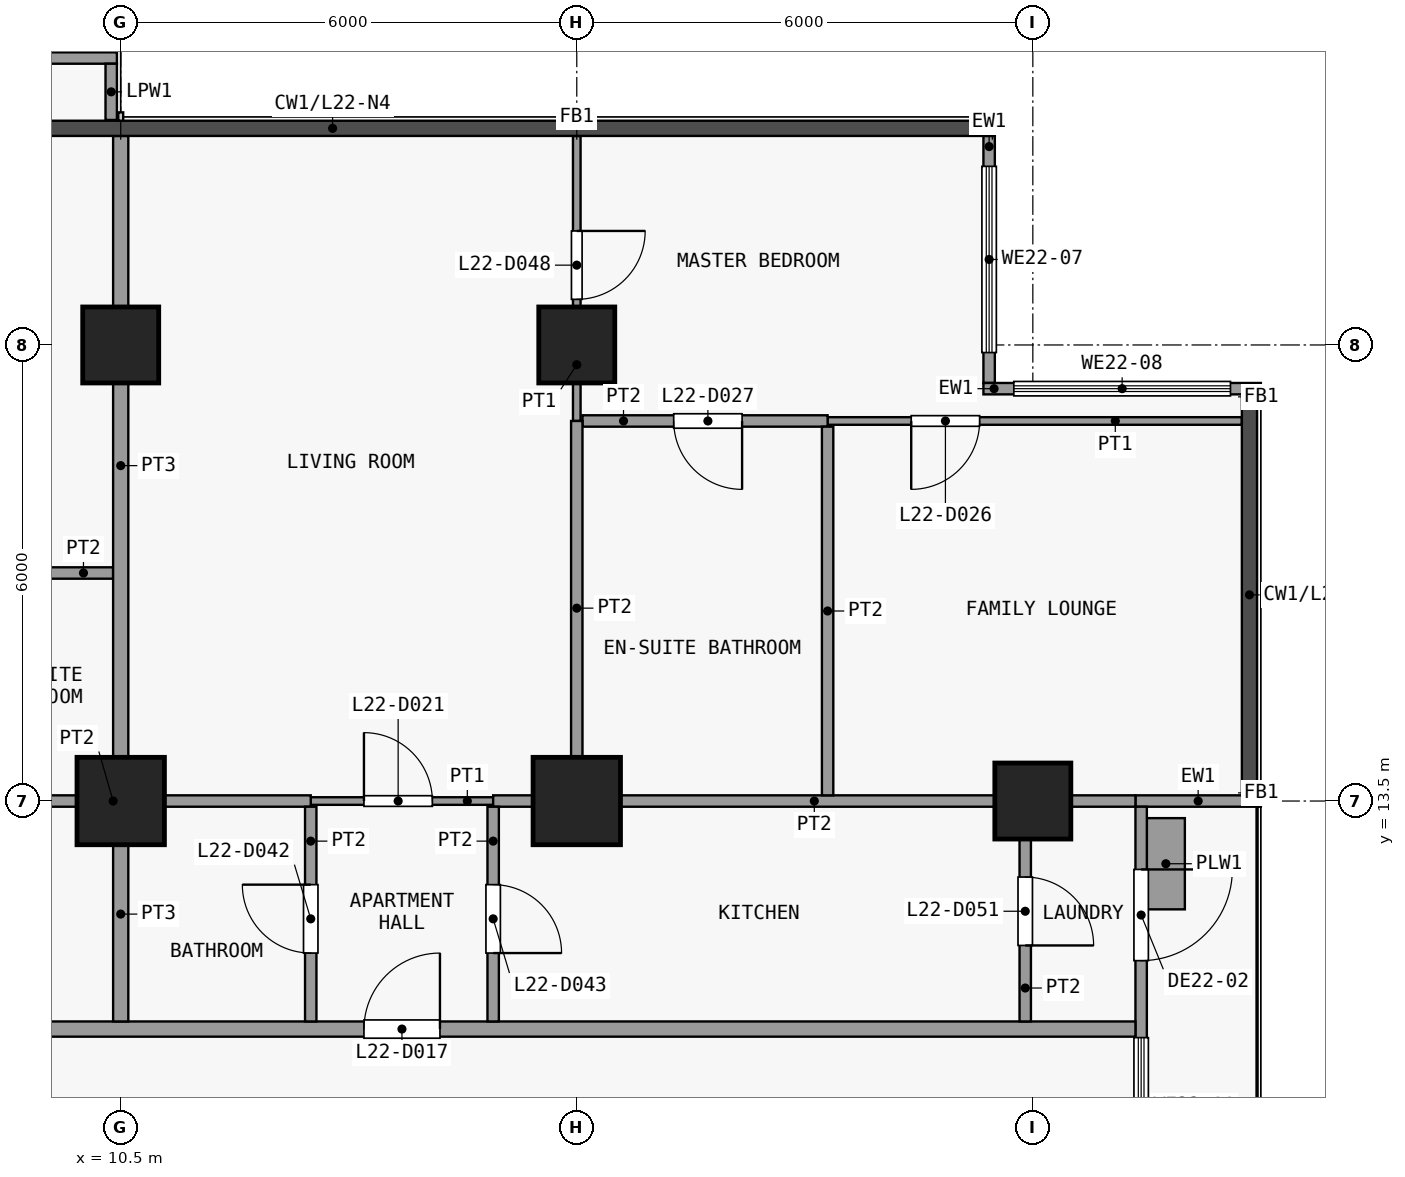
"""IFC4 building model, lengths in metres.
Left out: names, types, materials, properties, quantities, classifications, styles, units other than length and angle.
Written with IfcOpenShell. Run it as: python <this file> out.ifc"""

import sys

from ifc_helpers import new_model, si_unit, direction, frame, frame_2d, origin, origin_2d, place, context, subcontext, project, spatial, rectangle, extrude, element, fill, save


model = new_model("IFC4")
c1 = context("Model", 3, precision=1e-05, world=origin(), true_north=direction((0.0, 1.0)))
c2 = subcontext(c1, "Body", "Model", "MODEL_VIEW")
j1 = project(units=[si_unit("LENGTHUNIT", "METRE"), si_unit("PLANEANGLEUNIT", "RADIAN")], contexts=[c1])
p1 = place(None, origin())
s1 = spatial("IfcSite", under=j1, at=p1, CompositionType="ELEMENT")
p2 = place(p1, origin())
s2 = spatial("IfcBuilding", under=s1, at=p2, CompositionType="ELEMENT")
p3 = place(p2, frame((0.0, 0.0, 91.9)))
s3 = spatial("IfcBuildingStorey", under=s2, at=p3, CompositionType="ELEMENT", Elevation=91.9)
p4 = place(p3, frame((10.5, 13.5, 0.0), z_axis=(0.0, 0.0, 1.0), x_axis=(1.0, 0.0, 0.0)))
e1 = element("IfcColumn", 1, at=p4, inside=s3, PredefinedType="COLUMN", context=c2, shape_type="SweptSolid", body=[
    extrude(rectangle(XDim=1.15, YDim=1.15, at=origin_2d()), origin(), (0.0, 0.0, 1.0), 3.6),
])
p5 = place(p3, frame((10.5, 19.5, 0.0), z_axis=(0.0, 0.0, 1.0), x_axis=(1.0, 0.0, 0.0)))
e2 = element("IfcColumn", 2, at=p5, inside=s3, PredefinedType="COLUMN", context=c2, shape_type="SweptSolid", body=[
    extrude(rectangle(XDim=1.0, YDim=1.0, at=origin_2d()), origin(), (0.0, 0.0, 1.0), 3.6),
])
p6 = place(p3, frame((16.5, 13.5, 0.0), z_axis=(0.0, 0.0, 1.0), x_axis=(1.0, 0.0, 0.0)))
e3 = element("IfcColumn", 3, at=p6, inside=s3, PredefinedType="COLUMN", context=c2, shape_type="SweptSolid", body=[
    extrude(rectangle(XDim=1.15, YDim=1.15, at=origin_2d()), origin(), (0.0, 0.0, 1.0), 3.6),
])
for number, where, z_axis, x_axis in (
    (4, (16.5, 19.5, 0.0), (0.0, 0.0, 1.0), (1.0, 0.0, 0.0)),
    (5, (22.5, 13.5, 0.0), (0.0, 0.0, 1.0), (1.0, 0.0, 0.0)),
):
    element("IfcColumn", number, at=place(p3, frame(where, z_axis=z_axis, x_axis=x_axis)), inside=s3, PredefinedType="COLUMN", context=c2, shape_type="SweptSolid", body=[
        extrude(rectangle(XDim=1.0, YDim=1.0, at=origin_2d()), origin(), (0.0, 0.0, 1.0), 3.6),
    ])
p7 = place(p3, frame((21.925, 22.25, 0.0), z_axis=(0.0, 0.0, 1.0), x_axis=(0.0, -1.0, 0.0)))
e6 = element("IfcWall", 6, at=p7, inside=s3, PredefinedType="SOLIDWALL", context=c2, shape_type="SweptSolid", body=[
    extrude(rectangle(XDim=3.25, YDim=0.15, at=frame_2d((1.625, 0.0))), origin(), (0.0, 0.0, 1.0), 3.3),
])
p8 = place(p7, frame((0.4, 0.0, 0.9)))
e7 = element("IfcOpeningElement", 7, at=p8, cuts=e6, PredefinedType="OPENING", context=c2, shape_type="SweptSolid", body=[
    extrude(rectangle(XDim=2.45, YDim=2.4, at=frame_2d((1.225, 1.2))), frame((0.0, 0.085, 0.0), z_axis=(0.0, -1.0, 0.0), x_axis=(1.0, 0.0, 0.0)), (0.0, 0.0, 1.0), 0.17),
])
p9 = place(p3, frame((21.85, 18.925, 0.0), z_axis=(0.0, 0.0, 1.0), x_axis=(1.0, 0.0, 0.0)))
e8 = element("IfcWall", 8, at=p9, inside=s3, PredefinedType="SOLIDWALL", context=c2, shape_type="SweptSolid", body=[
    extrude(rectangle(XDim=3.65, YDim=0.15, at=frame_2d((1.825, 0.0))), origin(), (0.0, 0.0, 1.0), 3.3),
])
p10 = place(p9, frame((0.4, 0.0, 0.9)))
e9 = element("IfcOpeningElement", 9, at=p10, cuts=e8, PredefinedType="OPENING", context=c2, shape_type="SweptSolid", body=[
    extrude(rectangle(XDim=2.85, YDim=2.4, at=frame_2d((1.425, 1.2))), frame((0.0, 0.085, 0.0), z_axis=(0.0, -1.0, 0.0), x_axis=(1.0, 0.0, 0.0)), (0.0, 0.0, 1.0), 0.17),
])
p11 = place(p3, frame((23.85, 13.5, 0.0), z_axis=(0.0, 0.0, 1.0), x_axis=(1.0, 0.0, 0.0)))
e10 = element("IfcWall", 10, at=p11, inside=s3, PredefinedType="SOLIDWALL", context=c2, shape_type="SweptSolid", body=[
    extrude(rectangle(XDim=1.65, YDim=0.15, at=frame_2d((0.825, 0.0))), origin(), (0.0, 0.0, 1.0), 3.3),
])
p12 = place(p3, frame((23.925, 13.425, 0.0), z_axis=(0.0, 0.0, 1.0), x_axis=(0.0, -1.0, 0.0)))
e11 = element("IfcWall", 11, at=p12, inside=s3, PredefinedType="SOLIDWALL", context=c2, shape_type="SweptSolid", body=[
    extrude(rectangle(XDim=5.85, YDim=0.15, at=frame_2d((2.925, 0.0))), origin(), (0.0, 0.0, 1.0), 3.3),
])
p13 = place(p12, frame((0.825, 0.0, 0.0)))
e12 = element("IfcOpeningElement", 12, at=p13, cuts=e11, PredefinedType="OPENING", context=c2, shape_type="SweptSolid", body=[
    extrude(rectangle(XDim=1.2, YDim=2.4, at=frame_2d((0.6, 1.2))), frame((0.0, 0.085, 0.0), z_axis=(0.0, -1.0, 0.0), x_axis=(1.0, 0.0, 0.0)), (0.0, 0.0, 1.0), 0.17),
])
p14 = place(p12, frame((3.038, 0.0, 0.9)))
e13 = element("IfcOpeningElement", 13, at=p14, cuts=e11, PredefinedType="OPENING", context=c2, shape_type="SweptSolid", body=[
    extrude(rectangle(XDim=1.8, YDim=2.1, at=frame_2d((0.9, 1.05))), frame((0.0, 0.085, 0.0), z_axis=(0.0, -1.0, 0.0), x_axis=(1.0, 0.0, 0.0)), (0.0, 0.0, 1.0), 0.17),
])
p15 = place(p3, frame((24.25, 12.075, 0.0), z_axis=(0.0, 0.0, 1.0), x_axis=(0.0, 1.0, 0.0)))
e14 = element("IfcWall", 14, at=p15, inside=s3, PredefinedType="USERDEFINED", context=c2, shape_type="SweptSolid", body=[
    extrude(rectangle(XDim=1.2, YDim=0.5, at=frame_2d((0.6, 0.0))), origin(), (0.0, 0.0, 1.0), 0.9),
])
p16 = place(p3, frame((4.7, 23.275, 0.0), z_axis=(0.0, 0.0, 1.0), x_axis=(1.0, 0.0, 0.0)))
e15 = element("IfcWall", 15, at=p16, inside=s3, PredefinedType="PARAPET", context=c2, shape_type="SweptSolid", body=[
    extrude(rectangle(XDim=5.75, YDim=0.15, at=frame_2d((2.875, 0.0))), origin(), (0.0, 0.0, 1.0), 1.15),
])
p17 = place(p3, frame((10.375, 23.2, 0.0), z_axis=(0.0, 0.0, 1.0), x_axis=(0.0, -1.0, 0.0)))
e16 = element("IfcWall", 16, at=p17, inside=s3, PredefinedType="PARAPET", context=c2, shape_type="SweptSolid", body=[
    extrude(rectangle(XDim=0.74, YDim=0.15, at=frame_2d((0.37, 0.0))), origin(), (0.0, 0.0, 1.0), 1.15),
])
p18 = place(p3, frame((-26.25, 10.5, 0.0), z_axis=(0.0, 0.0, 1.0), x_axis=(1.0, 0.0, 0.0)))
e17 = element("IfcWall", 17, at=p18, inside=s3, PredefinedType="PARTITIONING", context=c2, shape_type="SweptSolid", body=[
    extrude(rectangle(XDim=50.1, YDim=0.2, at=frame_2d((25.05, 0.0))), origin(), (0.0, 0.0, 1.0), 3.3),
])
p19 = place(p18, frame((5.45, 0.0, 0.0)))
e18 = element("IfcOpeningElement", 18, at=p19, cuts=e17, PredefinedType="OPENING", context=c2, shape_type="SweptSolid", body=[
    extrude(rectangle(XDim=1.0, YDim=2.1, at=frame_2d((0.5, 1.05))), frame((0.0, 0.11, 0.0), z_axis=(0.0, -1.0, 0.0), x_axis=(1.0, 0.0, 0.0)), (0.0, 0.0, 1.0), 0.22),
])
p20 = place(p18, frame((13.95, 0.0, 0.0)))
e19 = element("IfcOpeningElement", 19, at=p20, cuts=e17, PredefinedType="OPENING", context=c2, shape_type="SweptSolid", body=[
    extrude(rectangle(XDim=1.0, YDim=2.1, at=frame_2d((0.5, 1.05))), frame((0.0, 0.11, 0.0), z_axis=(0.0, -1.0, 0.0), x_axis=(1.0, 0.0, 0.0)), (0.0, 0.0, 1.0), 0.22),
])
p21 = place(p18, frame((39.95, 0.0, 0.0)))
e20 = element("IfcOpeningElement", 20, at=p21, cuts=e17, PredefinedType="OPENING", context=c2, shape_type="SweptSolid", body=[
    extrude(rectangle(XDim=1.0, YDim=2.1, at=frame_2d((0.5, 1.05))), frame((0.0, 0.11, 0.0), z_axis=(0.0, -1.0, 0.0), x_axis=(1.0, 0.0, 0.0)), (0.0, 0.0, 1.0), 0.22),
])
p22 = place(p3, frame((13.0, 13.5, 0.0), z_axis=(0.0, 0.0, 1.0), x_axis=(1.0, 0.0, 0.0)))
e21 = element("IfcWall", 21, at=p22, inside=s3, PredefinedType="PARTITIONING", context=c2, shape_type="SweptSolid", body=[
    extrude(rectangle(XDim=2.4, YDim=0.1, at=frame_2d((1.2, 0.0))), origin(), (0.0, 0.0, 1.0), 3.3),
])
p23 = place(p22, frame((0.7, 0.0, 0.0)))
e22 = element("IfcOpeningElement", 22, at=p23, cuts=e21, PredefinedType="OPENING", context=c2, shape_type="SweptSolid", body=[
    extrude(rectangle(XDim=0.9, YDim=2.1, at=frame_2d((0.45, 1.05))), frame((0.0, 0.06, 0.0), z_axis=(0.0, -1.0, 0.0), x_axis=(1.0, 0.0, 0.0)), (0.0, 0.0, 1.0), 0.12),
])
p24 = place(p3, frame((7.8, 13.5, 0.0), z_axis=(0.0, 0.0, 1.0), x_axis=(1.0, 0.0, 0.0)))
e23 = element("IfcWall", 23, at=p24, inside=s3, PredefinedType="PARTITIONING", context=c2, shape_type="SweptSolid", body=[
    extrude(rectangle(XDim=5.2, YDim=0.15, at=frame_2d((2.6, 0.0))), origin(), (0.0, 0.0, 1.0), 3.3),
])
p25 = place(p3, frame((15.4, 13.5, 0.0), z_axis=(0.0, 0.0, 1.0), x_axis=(1.0, 0.0, 0.0)))
e24 = element("IfcWall", 24, at=p25, inside=s3, PredefinedType="PARTITIONING", context=c2, shape_type="SweptSolid", body=[
    extrude(rectangle(XDim=8.45, YDim=0.15, at=frame_2d((4.225, 0.0))), origin(), (0.0, 0.0, 1.0), 3.3),
])
p26 = place(p3, frame((7.8, 16.5, 0.0), z_axis=(0.0, 0.0, 1.0), x_axis=(1.0, 0.0, 0.0)))
e25 = element("IfcWall", 25, at=p26, inside=s3, PredefinedType="PARTITIONING", context=c2, shape_type="SweptSolid", body=[
    extrude(rectangle(XDim=2.6, YDim=0.15, at=frame_2d((1.3, 0.0))), origin(), (0.0, 0.0, 1.0), 3.3),
])
p27 = place(p26, frame((0.8, 0.0, 0.0)))
e26 = element("IfcOpeningElement", 26, at=p27, cuts=e25, PredefinedType="OPENING", context=c2, shape_type="SweptSolid", body=[
    extrude(rectangle(XDim=0.9, YDim=2.1, at=frame_2d((0.45, 1.05))), frame((0.0, 0.085, 0.0), z_axis=(0.0, -1.0, 0.0), x_axis=(1.0, 0.0, 0.0)), (0.0, 0.0, 1.0), 0.17),
])
p28 = place(p3, frame((19.8, 18.5, 0.0), z_axis=(0.0, 0.0, 1.0), x_axis=(1.0, 0.0, 0.0)))
e27 = element("IfcWall", 27, at=p28, inside=s3, PredefinedType="PARTITIONING", context=c2, shape_type="SweptSolid", body=[
    extrude(rectangle(XDim=5.45, YDim=0.1, at=frame_2d((2.725, 0.0))), origin(), (0.0, 0.0, 1.0), 3.3),
])
p29 = place(p28, frame((1.1, 0.0, 0.0)))
e28 = element("IfcOpeningElement", 28, at=p29, cuts=e27, PredefinedType="OPENING", context=c2, shape_type="SweptSolid", body=[
    extrude(rectangle(XDim=0.9, YDim=2.1, at=frame_2d((0.45, 1.05))), frame((0.0, 0.06, 0.0), z_axis=(0.0, -1.0, 0.0), x_axis=(1.0, 0.0, 0.0)), (0.0, 0.0, 1.0), 0.12),
])
p30 = place(p3, frame((16.575, 18.5, 0.0), z_axis=(0.0, 0.0, 1.0), x_axis=(1.0, 0.0, 0.0)))
e29 = element("IfcWall", 29, at=p30, inside=s3, PredefinedType="PARTITIONING", context=c2, shape_type="SweptSolid", body=[
    extrude(rectangle(XDim=3.225, YDim=0.15, at=frame_2d((1.613, 0.0))), origin(), (0.0, 0.0, 1.0), 3.3),
])
p31 = place(p30, frame((1.2, 0.0, 0.0)))
e30 = element("IfcOpeningElement", 30, at=p31, cuts=e29, PredefinedType="OPENING", context=c2, shape_type="SweptSolid", body=[
    extrude(rectangle(XDim=0.9, YDim=2.1, at=frame_2d((0.45, 1.05))), frame((0.0, 0.085, 0.0), z_axis=(0.0, -1.0, 0.0), x_axis=(1.0, 0.0, 0.0)), (0.0, 0.0, 1.0), 0.17),
])
p32 = place(p3, frame((10.5, 10.6, 0.0), z_axis=(0.0, 0.0, 1.0), x_axis=(0.0, 1.0, 0.0)))
e31 = element("IfcWall", 31, at=p32, inside=s3, PredefinedType="PARTITIONING", context=c2, shape_type="SweptSolid", body=[
    extrude(rectangle(XDim=2.825, YDim=0.2, at=frame_2d((1.413, 0.0))), origin(), (0.0, 0.0, 1.0), 3.3),
])
p33 = place(p3, frame((10.5, 13.575, 0.0), z_axis=(0.0, 0.0, 1.0), x_axis=(0.0, 1.0, 0.0)))
e32 = element("IfcWall", 32, at=p33, inside=s3, PredefinedType="PARTITIONING", context=c2, shape_type="SweptSolid", body=[
    extrude(rectangle(XDim=8.675, YDim=0.2, at=frame_2d((4.337, 0.0))), origin(), (0.0, 0.0, 1.0), 3.3),
])
p34 = place(p3, frame((13.0, 10.6, 0.0), z_axis=(0.0, 0.0, 1.0), x_axis=(0.0, 1.0, 0.0)))
e33 = element("IfcWall", 33, at=p34, inside=s3, PredefinedType="PARTITIONING", context=c2, shape_type="SweptSolid", body=[
    extrude(rectangle(XDim=2.825, YDim=0.15, at=frame_2d((1.413, 0.0))), origin(), (0.0, 0.0, 1.0), 3.3),
])
p35 = place(p34, frame((0.9, 0.0, 0.0)))
e34 = element("IfcOpeningElement", 34, at=p35, cuts=e33, PredefinedType="OPENING", context=c2, shape_type="SweptSolid", body=[
    extrude(rectangle(XDim=0.9, YDim=2.1, at=frame_2d((0.45, 1.05))), frame((0.0, 0.085, 0.0), z_axis=(0.0, -1.0, 0.0), x_axis=(1.0, 0.0, 0.0)), (0.0, 0.0, 1.0), 0.17),
])
p36 = place(p3, frame((15.4, 10.6, 0.0), z_axis=(0.0, 0.0, 1.0), x_axis=(0.0, 1.0, 0.0)))
e35 = element("IfcWall", 35, at=p36, inside=s3, PredefinedType="PARTITIONING", context=c2, shape_type="SweptSolid", body=[
    extrude(rectangle(XDim=2.825, YDim=0.15, at=frame_2d((1.413, 0.0))), origin(), (0.0, 0.0, 1.0), 3.3),
])
p37 = place(p36, frame((0.9, 0.0, 0.0)))
e36 = element("IfcOpeningElement", 36, at=p37, cuts=e35, PredefinedType="OPENING", context=c2, shape_type="SweptSolid", body=[
    extrude(rectangle(XDim=0.9, YDim=2.1, at=frame_2d((0.45, 1.05))), frame((0.0, 0.085, 0.0), z_axis=(0.0, -1.0, 0.0), x_axis=(1.0, 0.0, 0.0)), (0.0, 0.0, 1.0), 0.17),
])
p38 = place(p3, frame((16.5, 18.5, 0.0), z_axis=(0.0, 0.0, 1.0), x_axis=(0.0, 1.0, 0.0)))
e37 = element("IfcWall", 37, at=p38, inside=s3, PredefinedType="PARTITIONING", context=c2, shape_type="SweptSolid", body=[
    extrude(rectangle(XDim=3.75, YDim=0.1, at=frame_2d((1.875, 0.0))), origin(), (0.0, 0.0, 1.0), 3.3),
])
p39 = place(p38, frame((1.6, 0.0, 0.0)))
e38 = element("IfcOpeningElement", 38, at=p39, cuts=e37, PredefinedType="OPENING", context=c2, shape_type="SweptSolid", body=[
    extrude(rectangle(XDim=0.9, YDim=2.1, at=frame_2d((0.45, 1.05))), frame((0.0, 0.06, 0.0), z_axis=(0.0, -1.0, 0.0), x_axis=(1.0, 0.0, 0.0)), (0.0, 0.0, 1.0), 0.12),
])
p40 = place(p3, frame((16.5, 13.575, 0.0), z_axis=(0.0, 0.0, 1.0), x_axis=(0.0, 1.0, 0.0)))
e39 = element("IfcWall", 39, at=p40, inside=s3, PredefinedType="PARTITIONING", context=c2, shape_type="SweptSolid", body=[
    extrude(rectangle(XDim=4.925, YDim=0.15, at=frame_2d((2.462, 0.0))), origin(), (0.0, 0.0, 1.0), 3.3),
])
p41 = place(p3, frame((19.8, 13.575, 0.0), z_axis=(0.0, 0.0, 1.0), x_axis=(0.0, 1.0, 0.0)))
e40 = element("IfcWall", 40, at=p41, inside=s3, PredefinedType="PARTITIONING", context=c2, shape_type="SweptSolid", body=[
    extrude(rectangle(XDim=4.85, YDim=0.15, at=frame_2d((2.425, 0.0))), origin(), (0.0, 0.0, 1.0), 3.3),
])
p42 = place(p3, frame((22.4, 10.6, 0.0), z_axis=(0.0, 0.0, 1.0), x_axis=(0.0, 1.0, 0.0)))
e41 = element("IfcWall", 41, at=p42, inside=s3, PredefinedType="PARTITIONING", context=c2, shape_type="SweptSolid", body=[
    extrude(rectangle(XDim=2.825, YDim=0.15, at=frame_2d((1.413, 0.0))), origin(), (0.0, 0.0, 1.0), 3.3),
])
p43 = place(p42, frame((1.0, 0.0, 0.0)))
e42 = element("IfcOpeningElement", 42, at=p43, cuts=e41, PredefinedType="OPENING", context=c2, shape_type="SweptSolid", body=[
    extrude(rectangle(XDim=0.9, YDim=2.1, at=frame_2d((0.45, 1.05))), frame((0.0, 0.085, 0.0), z_axis=(0.0, -1.0, 0.0), x_axis=(1.0, 0.0, 0.0)), (0.0, 0.0, 1.0), 0.17),
])
p44 = place(p8, origin())
e43 = element("IfcWindow", 43, at=p44, inside=s3, PartitioningType="SINGLE_PANEL", PredefinedType="WINDOW", context=c2, shape_type="SweptSolid", body=[
    extrude(rectangle(XDim=2.45, YDim=2.4, at=frame_2d((1.225, 1.2))), frame((0.0, 0.03, 0.0), z_axis=(0.0, -1.0, 0.0), x_axis=(1.0, 0.0, 0.0)), (0.0, 0.0, 1.0), 0.06),
])
fill(e7, e43)
p45 = place(p10, origin())
e44 = element("IfcWindow", 44, at=p45, inside=s3, PartitioningType="SINGLE_PANEL", PredefinedType="WINDOW", context=c2, shape_type="SweptSolid", body=[
    extrude(rectangle(XDim=2.85, YDim=2.4, at=frame_2d((1.425, 1.2))), frame((0.0, 0.03, 0.0), z_axis=(0.0, -1.0, 0.0), x_axis=(1.0, 0.0, 0.0)), (0.0, 0.0, 1.0), 0.06),
])
fill(e9, e44)
p46 = place(p13, origin())
e45 = element("IfcDoor", 45, at=p46, inside=s3, OperationType="SINGLE_SWING_LEFT", PredefinedType="DOOR", context=c2, shape_type="SweptSolid", body=[
    extrude(rectangle(XDim=1.2, YDim=2.4, at=frame_2d((0.6, 1.2))), frame((0.0, 0.025, 0.0), z_axis=(0.0, -1.0, 0.0), x_axis=(1.0, 0.0, 0.0)), (0.0, 0.0, 1.0), 0.05),
])
fill(e12, e45)
p47 = place(p14, origin())
e46 = element("IfcWindow", 46, at=p47, inside=s3, PartitioningType="SINGLE_PANEL", PredefinedType="WINDOW", context=c2, shape_type="SweptSolid", body=[
    extrude(rectangle(XDim=1.8, YDim=2.1, at=frame_2d((0.9, 1.05))), frame((0.0, 0.03, 0.0), z_axis=(0.0, -1.0, 0.0), x_axis=(1.0, 0.0, 0.0)), (0.0, 0.0, 1.0), 0.06),
])
fill(e13, e46)
p48 = place(p21, origin())
e47 = element("IfcDoor", 47, at=p48, inside=s3, OperationType="SINGLE_SWING_LEFT", PredefinedType="DOOR", context=c2, shape_type="SweptSolid", body=[
    extrude(rectangle(XDim=1.0, YDim=2.1, at=frame_2d((0.5, 1.05))), frame((0.0, 0.025, 0.0), z_axis=(0.0, -1.0, 0.0), x_axis=(1.0, 0.0, 0.0)), (0.0, 0.0, 1.0), 0.05),
])
fill(e20, e47)
p49 = place(p23, origin())
e48 = element("IfcDoor", 48, at=p49, inside=s3, OperationType="SINGLE_SWING_RIGHT", PredefinedType="DOOR", context=c2, shape_type="SweptSolid", body=[
    extrude(rectangle(XDim=0.9, YDim=2.1, at=frame_2d((0.45, 1.05))), frame((0.0, 0.025, 0.0), z_axis=(0.0, -1.0, 0.0), x_axis=(1.0, 0.0, 0.0)), (0.0, 0.0, 1.0), 0.05),
])
fill(e22, e48)
p50 = place(p29, origin())
e49 = element("IfcDoor", 49, at=p50, inside=s3, OperationType="SINGLE_SWING_LEFT", PredefinedType="DOOR", context=c2, shape_type="SweptSolid", body=[
    extrude(rectangle(XDim=0.9, YDim=2.1, at=frame_2d((0.45, 1.05))), frame((0.0, 0.025, 0.0), z_axis=(0.0, -1.0, 0.0), x_axis=(1.0, 0.0, 0.0)), (0.0, 0.0, 1.0), 0.05),
])
fill(e28, e49)
p51 = place(p31, origin())
e50 = element("IfcDoor", 50, at=p51, inside=s3, OperationType="SINGLE_SWING_RIGHT", PredefinedType="DOOR", context=c2, shape_type="SweptSolid", body=[
    extrude(rectangle(XDim=0.9, YDim=2.1, at=frame_2d((0.45, 1.05))), frame((0.0, 0.025, 0.0), z_axis=(0.0, -1.0, 0.0), x_axis=(1.0, 0.0, 0.0)), (0.0, 0.0, 1.0), 0.05),
])
fill(e30, e50)
p52 = place(p35, origin())
e51 = element("IfcDoor", 51, at=p52, inside=s3, OperationType="SINGLE_SWING_LEFT", PredefinedType="DOOR", context=c2, shape_type="SweptSolid", body=[
    extrude(rectangle(XDim=0.9, YDim=2.1, at=frame_2d((0.45, 1.05))), frame((0.0, 0.025, 0.0), z_axis=(0.0, -1.0, 0.0), x_axis=(1.0, 0.0, 0.0)), (0.0, 0.0, 1.0), 0.05),
])
fill(e34, e51)
p53 = place(p37, origin())
e52 = element("IfcDoor", 52, at=p53, inside=s3, OperationType="SINGLE_SWING_LEFT", PredefinedType="DOOR", context=c2, shape_type="SweptSolid", body=[
    extrude(rectangle(XDim=0.9, YDim=2.1, at=frame_2d((0.45, 1.05))), frame((0.0, 0.025, 0.0), z_axis=(0.0, -1.0, 0.0), x_axis=(1.0, 0.0, 0.0)), (0.0, 0.0, 1.0), 0.05),
])
fill(e36, e52)
p54 = place(p39, origin())
e53 = element("IfcDoor", 53, at=p54, inside=s3, OperationType="SINGLE_SWING_RIGHT", PredefinedType="DOOR", context=c2, shape_type="SweptSolid", body=[
    extrude(rectangle(XDim=0.9, YDim=2.1, at=frame_2d((0.45, 1.05))), frame((0.0, 0.025, 0.0), z_axis=(0.0, -1.0, 0.0), x_axis=(1.0, 0.0, 0.0)), (0.0, 0.0, 1.0), 0.05),
])
fill(e38, e53)
p55 = place(p43, origin())
e54 = element("IfcDoor", 54, at=p55, inside=s3, OperationType="SINGLE_SWING_LEFT", PredefinedType="DOOR", context=c2, shape_type="SweptSolid", body=[
    extrude(rectangle(XDim=0.9, YDim=2.1, at=frame_2d((0.45, 1.05))), frame((0.0, 0.025, 0.0), z_axis=(0.0, -1.0, 0.0), x_axis=(1.0, 0.0, 0.0)), (0.0, 0.0, 1.0), 0.05),
])
fill(e42, e54)
save(model, sys.argv[1])
